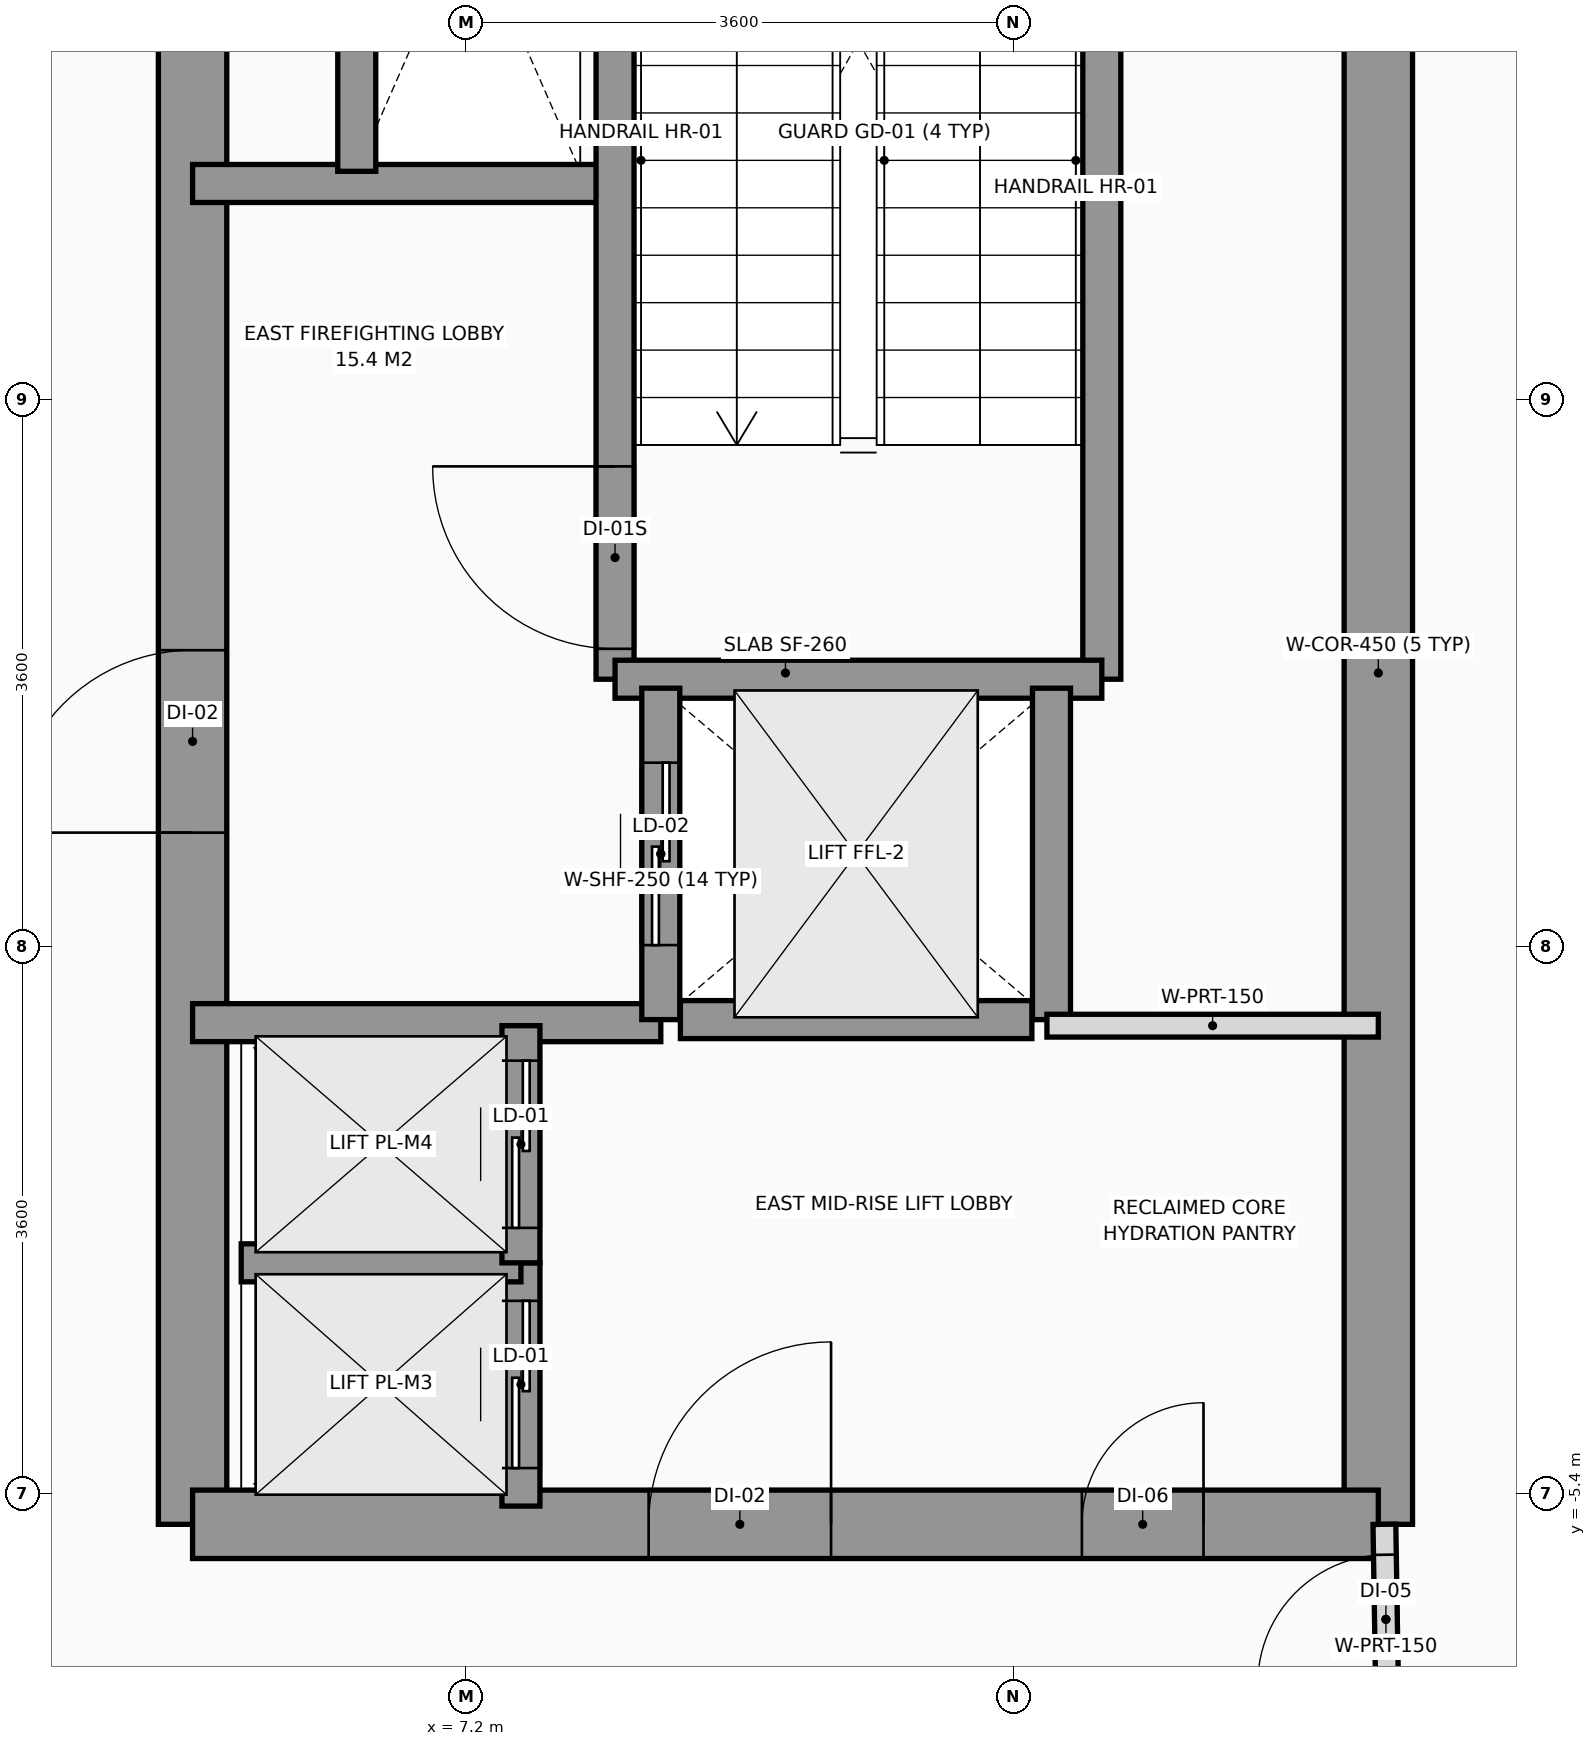
"""IFC4 building model, lengths in metres.
Left out: names, types, materials, properties, quantities, classifications, styles, units other than length and angle.
Written with IfcOpenShell. Run it as: python <this file> out.ifc"""

import sys

from ifc_helpers import new_model, si_unit, direction, frame, frame_2d, origin, place, context, subcontext, project, spatial, rectangle, extrude, source, transform, mapped, element, fill, save


model = new_model("IFC4")
c1 = context("Model", 3, precision=1e-05, world=origin(), true_north=direction((0.0, 1.0)))
c2 = subcontext(c1, "Body", "Model", "MODEL_VIEW")
j1 = project(units=[si_unit("LENGTHUNIT", "METRE"), si_unit("PLANEANGLEUNIT", "RADIAN")], contexts=[c1])
p1 = place(None, origin())
s1 = spatial("IfcSite", under=j1, at=p1, CompositionType="ELEMENT")
p2 = place(p1, origin())
s2 = spatial("IfcBuilding", under=s1, at=p2, CompositionType="ELEMENT")
p3 = place(p2, frame((0.0, 0.0, 151.6)))
s3 = spatial("IfcBuildingStorey", under=s2, at=p3, CompositionType="ELEMENT", Elevation=151.6)
p4 = place(p3, frame((13.2, -5.6, 0.0), z_axis=(0.0, 0.0, 1.0), x_axis=(0.0, 1.0, 0.0)))
e1 = element("IfcWall", 1, at=p4, inside=s3, PredefinedType="SHEAR", context=c2, shape_type="SweptSolid", body=[
    extrude(rectangle(XDim=11.2, YDim=0.45, at=frame_2d((5.6, 0.0))), origin(), (0.0, 0.0, 1.0), 4.4),
])
p5 = place(p3, frame((5.4, -5.6, 0.0), z_axis=(0.0, 0.0, 1.0), x_axis=(0.0, 1.0, 0.0)))
e2 = element("IfcWall", 2, at=p5, inside=s3, PredefinedType="SHEAR", context=c2, shape_type="SweptSolid", body=[
    extrude(rectangle(XDim=12.5, YDim=0.45, at=frame_2d((6.25, 0.0))), origin(), (0.0, 0.0, 1.0), 4.4),
])
p6 = place(p5, frame((4.55, 0.0, 0.0)))
e3 = element("IfcOpeningElement", 3, at=p6, cuts=e2, PredefinedType="OPENING", context=c2, shape_type="SweptSolid", body=[
    extrude(rectangle(XDim=1.2, YDim=2.2, at=frame_2d((0.6, 1.1))), frame((0.0, 0.235, 0.0), z_axis=(0.0, -1.0, 0.0), x_axis=(1.0, 0.0, 0.0)), (0.0, 0.0, 1.0), 0.47),
])
p7 = place(p3, frame((5.4, -5.6, 0.0), z_axis=(0.0, 0.0, 1.0), x_axis=(1.0, 0.0, 0.0)))
e4 = element("IfcWall", 4, at=p7, inside=s3, PredefinedType="SHEAR", context=c2, shape_type="SweptSolid", body=[
    extrude(rectangle(XDim=7.8, YDim=0.45, at=frame_2d((3.9, 0.0))), origin(), (0.0, 0.0, 1.0), 4.4),
])
p8 = place(p7, frame((3.0, 0.0, 0.0)))
e5 = element("IfcOpeningElement", 5, at=p8, cuts=e4, PredefinedType="OPENING", context=c2, shape_type="SweptSolid", body=[
    extrude(rectangle(XDim=1.2, YDim=2.2, at=frame_2d((0.6, 1.1))), frame((0.0, 0.235, 0.0), z_axis=(0.0, -1.0, 0.0), x_axis=(1.0, 0.0, 0.0)), (0.0, 0.0, 1.0), 0.47),
])
p9 = place(p7, frame((5.85, 0.0, 0.0)))
e6 = element("IfcOpeningElement", 6, at=p9, cuts=e4, PredefinedType="OPENING", context=c2, shape_type="SweptSolid", body=[
    extrude(rectangle(XDim=0.8, YDim=2.1, at=frame_2d((0.4, 1.05))), frame((0.0, 0.235, 0.0), z_axis=(0.0, -1.0, 0.0), x_axis=(1.0, 0.0, 0.0)), (0.0, 0.0, 1.0), 0.47),
])
p10 = place(p3, frame((5.4, 3.22, 0.0), z_axis=(0.0, 0.0, 1.0), x_axis=(1.0, 0.0, 0.0)))
e7 = element("IfcWall", 7, at=p10, inside=s3, PredefinedType="SOLIDWALL", context=c2, shape_type="SweptSolid", body=[
    extrude(rectangle(XDim=2.78, YDim=0.25, at=frame_2d((1.39, 0.0))), origin(), (0.0, 0.0, 1.0), 4.4),
])
p11 = place(p3, frame((5.4, -2.3, 0.0), z_axis=(0.0, 0.0, 1.0), x_axis=(1.0, 0.0, 0.0)))
e8 = element("IfcWall", 8, at=p11, inside=s3, PredefinedType="SOLIDWALL", context=c2, shape_type="SweptSolid", body=[
    extrude(rectangle(XDim=3.08, YDim=0.25, at=frame_2d((1.54, 0.0))), origin(), (0.0, 0.0, 1.0), 4.4),
])
p12 = place(p3, frame((8.179, -0.041, 0.0), z_axis=(0.0, 0.0, 1.0), x_axis=(0.0, 1.0, 0.0)))
e9 = element("IfcWall", 9, at=p12, inside=s3, PredefinedType="SOLIDWALL", context=c2, shape_type="SweptSolid", body=[
    extrude(rectangle(XDim=6.941, YDim=0.25, at=frame_2d((3.47, 0.0))), origin(), (0.0, 0.0, 1.0), 4.4),
])
p13 = place(p12, frame((0.2, 0.0, 0.0)))
e10 = element("IfcOpeningElement", 10, at=p13, cuts=e9, PredefinedType="OPENING", context=c2, shape_type="SweptSolid", body=[
    extrude(rectangle(XDim=1.2, YDim=2.2, at=frame_2d((0.6, 1.1))), frame((0.0, 0.135, 0.0), z_axis=(0.0, -1.0, 0.0), x_axis=(1.0, 0.0, 0.0)), (0.0, 0.0, 1.0), 0.27),
])
p14 = place(p3, frame((11.381, -0.041, 0.0), z_axis=(0.0, 0.0, 1.0), x_axis=(0.0, 1.0, 0.0)))
e11 = element("IfcWall", 11, at=p14, inside=s3, PredefinedType="SOLIDWALL", context=c2, shape_type="SweptSolid", body=[
    extrude(rectangle(XDim=6.941, YDim=0.25, at=frame_2d((3.47, 0.0))), origin(), (0.0, 0.0, 1.0), 4.4),
])
p15 = place(p3, frame((8.179, -0.041, 0.0), z_axis=(0.0, 0.0, 1.0), x_axis=(1.0, 0.0, 0.0)))
e12 = element("IfcWall", 12, at=p15, inside=s3, PredefinedType="SOLIDWALL", context=c2, shape_type="SweptSolid", body=[
    extrude(rectangle(XDim=3.202, YDim=0.25, at=frame_2d((1.601, 0.0))), origin(), (0.0, 0.0, 1.0), 4.4),
])
p16 = place(p3, frame((8.48, -2.28, 0.0), z_axis=(0.0, 0.0, 1.0), x_axis=(0.0, 1.0, 0.0)))
e13 = element("IfcWall", 13, at=p16, inside=s3, PredefinedType="SOLIDWALL", context=c2, shape_type="SweptSolid", body=[
    extrude(rectangle(XDim=2.18, YDim=0.25, at=frame_2d((1.09, 0.0))), origin(), (0.0, 0.0, 1.0), 4.4),
])
p17 = place(p16, frame((0.49, 0.0, 0.0)))
e14 = element("IfcOpeningElement", 14, at=p17, cuts=e13, PredefinedType="OPENING", context=c2, shape_type="SweptSolid", body=[
    extrude(rectangle(XDim=1.2, YDim=2.2, at=frame_2d((0.6, 1.1))), frame((0.0, 0.135, 0.0), z_axis=(0.0, -1.0, 0.0), x_axis=(1.0, 0.0, 0.0)), (0.0, 0.0, 1.0), 0.27),
])
p18 = place(p3, frame((11.05, -2.28, 0.0), z_axis=(0.0, 0.0, 1.0), x_axis=(0.0, 1.0, 0.0)))
e15 = element("IfcWall", 15, at=p18, inside=s3, PredefinedType="SOLIDWALL", context=c2, shape_type="SweptSolid", body=[
    extrude(rectangle(XDim=2.18, YDim=0.25, at=frame_2d((1.09, 0.0))), origin(), (0.0, 0.0, 1.0), 4.4),
])
p19 = place(p3, frame((8.609, -2.28, 0.0), z_axis=(0.0, 0.0, 1.0), x_axis=(1.0, 0.0, 0.0)))
e16 = element("IfcWall", 16, at=p19, inside=s3, PredefinedType="SOLIDWALL", context=c2, shape_type="SweptSolid", body=[
    extrude(rectangle(XDim=2.312, YDim=0.25, at=frame_2d((1.156, 0.0))), origin(), (0.0, 0.0, 1.0), 4.4),
])
p20 = place(p3, frame((7.56, -5.48, 0.0), z_axis=(0.0, 0.0, 1.0), x_axis=(0.0, 1.0, 0.0)))
e17 = element("IfcWall", 17, at=p20, inside=s3, PredefinedType="SOLIDWALL", context=c2, shape_type="SweptSolid", body=[
    extrude(rectangle(XDim=1.6, YDim=0.25, at=frame_2d((0.8, 0.0))), origin(), (0.0, 0.0, 1.0), 4.4),
])
p21 = place(p20, frame((0.25, 0.0, 0.0)))
e18 = element("IfcOpeningElement", 18, at=p21, cuts=e17, PredefinedType="OPENING", context=c2, shape_type="SweptSolid", body=[
    extrude(rectangle(XDim=1.1, YDim=2.2, at=frame_2d((0.55, 1.1))), frame((0.0, 0.135, 0.0), z_axis=(0.0, -1.0, 0.0), x_axis=(1.0, 0.0, 0.0)), (0.0, 0.0, 1.0), 0.27),
])
p22 = place(p3, frame((5.72, -3.88, 0.0), z_axis=(0.0, 0.0, 1.0), x_axis=(1.0, 0.0, 0.0)))
e19 = element("IfcWall", 19, at=p22, inside=s3, PredefinedType="SOLIDWALL", context=c2, shape_type="SweptSolid", body=[
    extrude(rectangle(XDim=1.84, YDim=0.25, at=frame_2d((0.92, 0.0))), origin(), (0.0, 0.0, 1.0), 4.4),
])
p23 = place(p3, frame((7.56, -3.88, 0.0), z_axis=(0.0, 0.0, 1.0), x_axis=(0.0, 1.0, 0.0)))
e20 = element("IfcWall", 20, at=p23, inside=s3, PredefinedType="SOLIDWALL", context=c2, shape_type="SweptSolid", body=[
    extrude(rectangle(XDim=1.56, YDim=0.25, at=frame_2d((0.78, 0.0))), origin(), (0.0, 0.0, 1.0), 4.4),
])
p24 = place(p23, frame((0.23, 0.0, 0.0)))
e21 = element("IfcOpeningElement", 21, at=p24, cuts=e20, PredefinedType="OPENING", context=c2, shape_type="SweptSolid", body=[
    extrude(rectangle(XDim=1.1, YDim=2.2, at=frame_2d((0.55, 1.1))), frame((0.0, 0.135, 0.0), z_axis=(0.0, -1.0, 0.0), x_axis=(1.0, 0.0, 0.0)), (0.0, 0.0, 1.0), 0.27),
])
p25 = place(p3, frame((6.48, 3.3, 0.0), z_axis=(0.0, 0.0, 1.0), x_axis=(0.0, 1.0, 0.0)))
e22 = element("IfcWall", 22, at=p25, inside=s3, PredefinedType="SOLIDWALL", context=c2, shape_type="SweptSolid", body=[
    extrude(rectangle(XDim=1.68, YDim=0.25, at=frame_2d((0.84, 0.0))), origin(), (0.0, 0.0, 1.0), 4.4),
])
p26 = place(p3, frame((11.02, -2.32, 0.0), z_axis=(0.0, 0.0, 1.0), x_axis=(1.0, 0.0, 0.0)))
e23 = element("IfcWall", 23, at=p26, inside=s3, PredefinedType="PARTITIONING", context=c2, shape_type="SweptSolid", body=[
    extrude(rectangle(XDim=2.18, YDim=0.15, at=frame_2d((1.09, 0.0))), origin(), (0.0, 0.0, 1.0), 4.4),
])
p27 = place(p3, frame((13.26, -6.85, 0.0), z_axis=(0.0, 0.0, 1.0), x_axis=(-0.016013571389, 0.999871774545, 0.0)))
e24 = element("IfcWall", 24, at=p27, inside=s3, PredefinedType="PARTITIONING", context=c2, shape_type="SweptSolid", body=[
    extrude(rectangle(XDim=1.25, YDim=0.15, at=frame_2d((0.625, 0.0))), origin(), (0.0, 0.0, 1.0), 4.4),
])
p28 = place(p27, frame((0.2, 0.0, 0.0)))
e25 = element("IfcOpeningElement", 25, at=p28, cuts=e24, PredefinedType="OPENING", context=c2, shape_type="SweptSolid", body=[
    extrude(rectangle(XDim=0.85, YDim=2.1, at=frame_2d((0.425, 1.05))), frame((0.0, 0.085, 0.0), z_axis=(0.0, -1.0, 0.0), x_axis=(1.0, 0.0, 0.0)), (0.0, 0.0, 1.0), 0.17),
])
m1 = source(origin(), c2, "Body", "SweptSolid", [
    extrude(rectangle(XDim=1.2, YDim=2.2, at=frame_2d((0.6, 1.1))), frame((0.0, 0.025, 0.0), z_axis=(0.0, -1.0, 0.0), x_axis=(1.0, 0.0, 0.0)), (0.0, 0.0, 1.0), 0.05),
])
p29 = place(p13, origin())
e26 = element("IfcDoor", 26, at=p29, inside=s3, OperationType="SINGLE_SWING_RIGHT", PredefinedType="DOOR", context=c2, shape_type="MappedRepresentation", body=[
    mapped(m1, transform((0.0, 0.0, 0.0), x_axis=(1.0, 0.0, 0.0), y_axis=(0.0, 1.0, 0.0), z_axis=(0.0, 0.0, 1.0), scale=1.0)),
])
fill(e10, e26)
p30 = place(p6, origin())
e27 = element("IfcDoor", 27, at=p30, inside=s3, OperationType="SINGLE_SWING_LEFT", PredefinedType="DOOR", context=c2, shape_type="MappedRepresentation", body=[
    mapped(m1, transform((0.0, 0.0, 0.0), x_axis=(1.0, 0.0, 0.0), y_axis=(0.0, 1.0, 0.0), z_axis=(0.0, 0.0, 1.0), scale=1.0)),
])
fill(e3, e27)
p31 = place(p8, origin())
e28 = element("IfcDoor", 28, at=p31, inside=s3, OperationType="SINGLE_SWING_RIGHT", PredefinedType="DOOR", context=c2, shape_type="MappedRepresentation", body=[
    mapped(m1, transform((0.0, 0.0, 0.0), x_axis=(1.0, 0.0, 0.0), y_axis=(0.0, 1.0, 0.0), z_axis=(0.0, 0.0, 1.0), scale=1.0)),
])
fill(e5, e28)
m2 = source(origin(), c2, "Body", "SweptSolid", [
    extrude(rectangle(XDim=0.8, YDim=2.1, at=frame_2d((0.4, 1.05))), frame((0.0, 0.025, 0.0), z_axis=(0.0, -1.0, 0.0), x_axis=(1.0, 0.0, 0.0)), (0.0, 0.0, 1.0), 0.05),
])
p32 = place(p9, origin())
e29 = element("IfcDoor", 29, at=p32, inside=s3, OperationType="SINGLE_SWING_RIGHT", PredefinedType="DOOR", context=c2, shape_type="MappedRepresentation", body=[
    mapped(m2, transform((0.0, 0.0, 0.0), x_axis=(1.0, 0.0, 0.0), y_axis=(0.0, 1.0, 0.0), z_axis=(0.0, 0.0, 1.0), scale=1.0)),
])
fill(e6, e29)
p33 = place(p17, origin())
e30 = element("IfcDoor", 30, at=p33, inside=s3, OperationType="SLIDING_TO_RIGHT", PredefinedType="DOOR", context=c2, shape_type="MappedRepresentation", body=[
    mapped(m1, transform((0.0, 0.0, 0.0), x_axis=(1.0, 0.0, 0.0), y_axis=(0.0, 1.0, 0.0), z_axis=(0.0, 0.0, 1.0), scale=1.0)),
])
fill(e14, e30)
m3 = source(origin(), c2, "Body", "SweptSolid", [
    extrude(rectangle(XDim=1.1, YDim=2.2, at=frame_2d((0.55, 1.1))), frame((0.0, 0.025, 0.0), z_axis=(0.0, -1.0, 0.0), x_axis=(1.0, 0.0, 0.0)), (0.0, 0.0, 1.0), 0.05),
])
p34 = place(p21, origin())
e31 = element("IfcDoor", 31, at=p34, inside=s3, OperationType="SLIDING_TO_LEFT", PredefinedType="DOOR", context=c2, shape_type="MappedRepresentation", body=[
    mapped(m3, transform((0.0, 0.0, 0.0), x_axis=(1.0, 0.0, 0.0), y_axis=(0.0, 1.0, 0.0), z_axis=(0.0, 0.0, 1.0), scale=1.0)),
])
fill(e18, e31)
p35 = place(p24, origin())
e32 = element("IfcDoor", 32, at=p35, inside=s3, OperationType="SLIDING_TO_LEFT", PredefinedType="DOOR", context=c2, shape_type="MappedRepresentation", body=[
    mapped(m3, transform((0.0, 0.0, 0.0), x_axis=(1.0, 0.0, 0.0), y_axis=(0.0, 1.0, 0.0), z_axis=(0.0, 0.0, 1.0), scale=1.0)),
])
fill(e21, e32)
m4 = source(origin(), c2, "Body", "SweptSolid", [
    extrude(rectangle(XDim=0.85, YDim=2.1, at=frame_2d((0.425, 1.05))), frame((0.0, 0.025, 0.0), z_axis=(0.0, -1.0, 0.0), x_axis=(1.0, 0.0, 0.0)), (0.0, 0.0, 1.0), 0.05),
])
p36 = place(p28, origin())
e33 = element("IfcDoor", 33, at=p36, inside=s3, OperationType="SINGLE_SWING_LEFT", PredefinedType="DOOR", context=c2, shape_type="MappedRepresentation", body=[
    mapped(m4, transform((0.0, 0.0, 0.0), x_axis=(1.0, 0.0, 0.0), y_axis=(0.0, 1.0, 0.0), z_axis=(0.0, 0.0, 1.0), scale=1.0)),
])
fill(e25, e33)
save(model, sys.argv[1])
